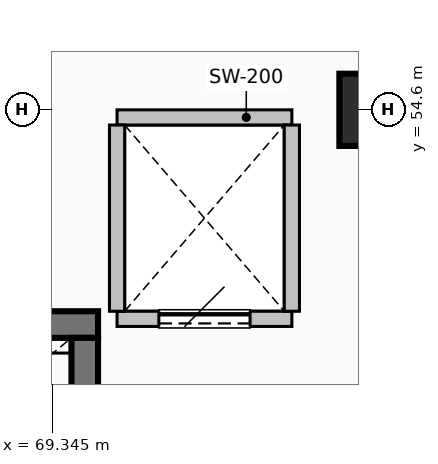
"""IFC4 building model, lengths in metres.
Left out: names, types, materials, properties, quantities, classifications, styles, units other than length and angle.
Written with IfcOpenShell. Run it as: python <this file> out.ifc"""

import sys

from ifc_helpers import new_model, si_unit, direction, frame, frame_2d, origin, origin_2d, place, context, subcontext, project, spatial, rectangle, extrude, element, fill, save


model = new_model("IFC4")
c1 = context("Model", 3, precision=1e-05, world=origin(), true_north=direction((0.0, 1.0)))
c2 = subcontext(c1, "Body", "Model", "MODEL_VIEW")
j1 = project(units=[si_unit("LENGTHUNIT", "METRE"), si_unit("PLANEANGLEUNIT", "RADIAN")], contexts=[c1])
p1 = place(None, origin())
s1 = spatial("IfcSite", under=j1, at=p1, CompositionType="ELEMENT")
p2 = place(p1, origin())
s2 = spatial("IfcBuilding", under=s1, at=p2, CompositionType="ELEMENT")
p3 = place(p2, frame((0.0, 0.0, 5.4)))
s3 = spatial("IfcBuildingStorey", under=s2, at=p3, CompositionType="ELEMENT", Elevation=5.4)
p4 = place(p3, frame((73.6, 54.6, 0.0), z_axis=(0.0, 0.0, 1.0), x_axis=(1.0, 0.0, 0.0)))
e1 = element("IfcColumn", 1, at=p4, inside=s3, PredefinedType="COLUMN", context=c2, shape_type="SweptSolid", body=[
    extrude(rectangle(XDim=0.95, YDim=0.95, at=origin_2d()), origin(), (0.0, 0.0, 1.0), 4.8),
])
p5 = place(p3, frame((69.95, 51.775, 0.0), z_axis=(0.0, 0.0, 1.0), x_axis=(-1.0, 0.0, 0.0)))
e2 = element("IfcWall", 2, at=p5, inside=s3, PredefinedType="SHEAR", context=c2, shape_type="SweptSolid", body=[
    extrude(rectangle(XDim=8.5, YDim=0.35, at=frame_2d((4.25, 0.0))), origin(), (0.0, 0.0, 1.0), 4.48),
])
p6 = place(p3, frame((69.775, 51.6, 0.0), z_axis=(0.0, 0.0, 1.0), x_axis=(0.0, -1.0, 0.0)))
e3 = element("IfcWall", 3, at=p6, inside=s3, PredefinedType="SHEAR", context=c2, shape_type="SweptSolid", body=[
    extrude(rectangle(XDim=3.8, YDim=0.35, at=frame_2d((1.9, 0.0))), origin(), (0.0, 0.0, 1.0), 4.48),
])
p7 = place(p3, frame((70.2, 51.85, 0.0), z_axis=(0.0, 0.0, 1.0), x_axis=(1.0, 0.0, 0.0)))
e4 = element("IfcWall", 4, at=p7, inside=s3, PredefinedType="PARTITIONING", context=c2, shape_type="SweptSolid", body=[
    extrude(rectangle(XDim=2.3, YDim=0.2, at=frame_2d((1.15, 0.0))), origin(), (0.0, 0.0, 1.0), 4.472),
])
p8 = place(p7, frame((0.55, 0.0, 0.0)))
e5 = element("IfcOpeningElement", 5, at=p8, cuts=e4, PredefinedType="OPENING", context=c2, shape_type="SweptSolid", body=[
    extrude(rectangle(XDim=1.2, YDim=2.15, at=frame_2d((0.6, 1.075))), frame((0.0, 0.11, 0.0), z_axis=(0.0, -1.0, 0.0), x_axis=(1.0, 0.0, 0.0)), (0.0, 0.0, 1.0), 0.22),
])
p9 = place(p3, frame((72.5, 54.5, 0.0), z_axis=(0.0, 0.0, 1.0), x_axis=(-1.0, 0.0, 0.0)))
e6 = element("IfcWall", 6, at=p9, inside=s3, PredefinedType="PARTITIONING", context=c2, shape_type="SweptSolid", body=[
    extrude(rectangle(XDim=2.3, YDim=0.2, at=frame_2d((1.15, 0.0))), origin(), (0.0, 0.0, 1.0), 3.722),
])
for number, where, z_axis, x_axis in (
    (7, (70.2, 51.95, 0.0), (0.0, 0.0, 1.0), (0.0, 1.0, 0.0)),
    (8, (72.5, 54.4, 0.0), (0.0, 0.0, 1.0), (0.0, -1.0, 0.0)),
):
    element("IfcWall", number, at=place(p3, frame(where, z_axis=z_axis, x_axis=x_axis)), inside=s3, PredefinedType="PARTITIONING", context=c2, shape_type="SweptSolid", body=[
        extrude(rectangle(XDim=2.45, YDim=0.2, at=frame_2d((1.225, 0.0))), origin(), (0.0, 0.0, 1.0), 4.472),
    ])
p10 = place(p8, origin())
e9 = element("IfcDoor", 9, at=p10, inside=s3, OperationType="SLIDING_TO_LEFT", PredefinedType="DOOR", context=c2, shape_type="SweptSolid", body=[
    extrude(rectangle(XDim=1.2, YDim=2.15, at=frame_2d((0.6, 1.075))), frame((0.0, 0.025, 0.0), z_axis=(0.0, -1.0, 0.0), x_axis=(1.0, 0.0, 0.0)), (0.0, 0.0, 1.0), 0.05),
])
fill(e5, e9)
save(model, sys.argv[1])
